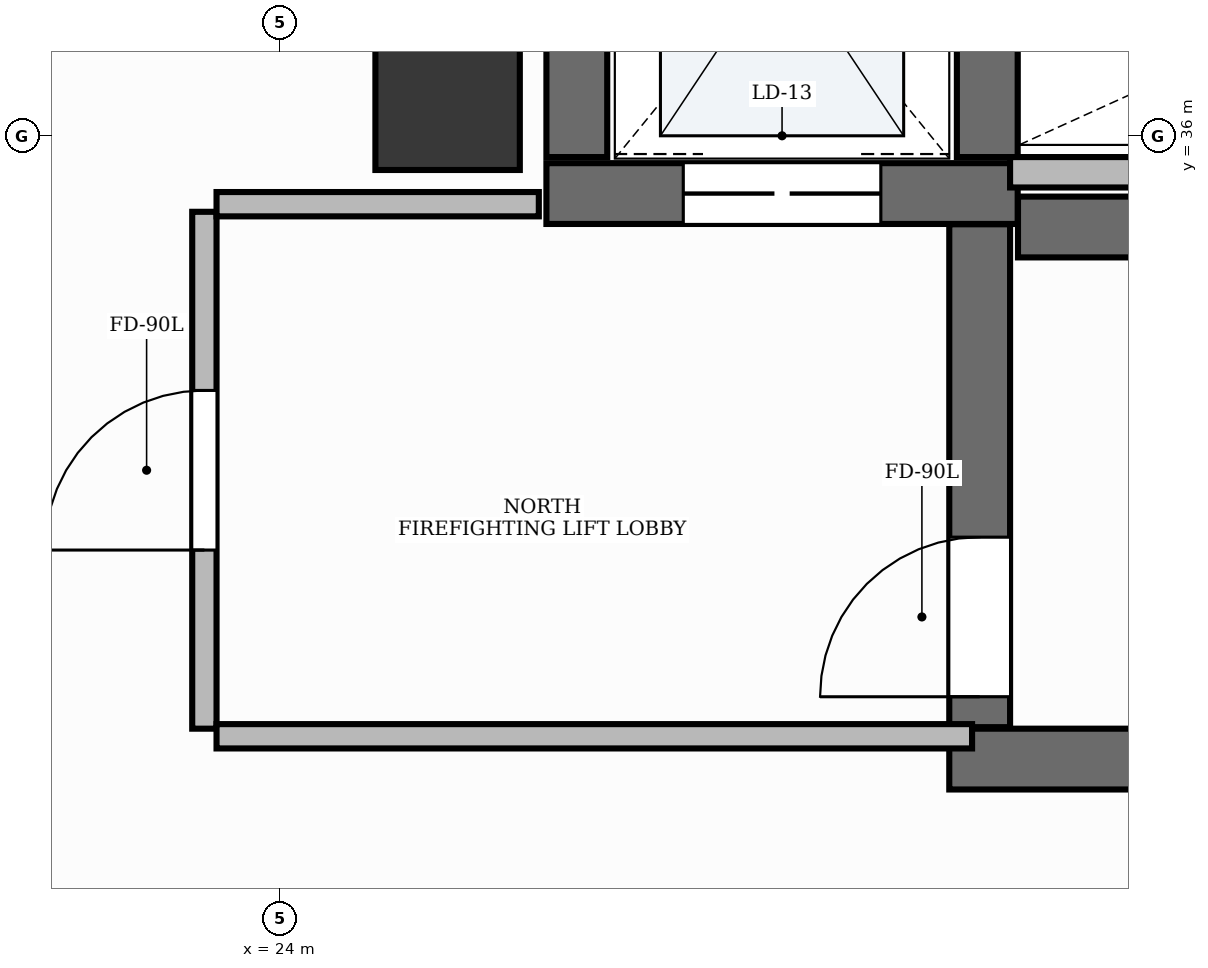
"""IFC4 building model, lengths in metres.
Left out: names, types, materials, properties, quantities, classifications, styles, units other than length and angle.
Written with IfcOpenShell. Run it as: python <this file> out.ifc"""

import sys

from ifc_helpers import new_model, si_unit, direction, frame, frame_2d, origin, origin_2d, place, context, subcontext, project, spatial, rectangle, extrude, element, fill, save


model = new_model("IFC4")
c1 = context("Model", 3, precision=1e-05, world=origin(), true_north=direction((0.0, 1.0)))
c2 = subcontext(c1, "Body", "Model", "MODEL_VIEW")
j1 = project(units=[si_unit("LENGTHUNIT", "METRE"), si_unit("PLANEANGLEUNIT", "RADIAN")], contexts=[c1])
p1 = place(None, origin())
s1 = spatial("IfcSite", under=j1, at=p1, CompositionType="ELEMENT")
p2 = place(p1, origin())
s2 = spatial("IfcBuilding", under=s1, at=p2, CompositionType="ELEMENT")
p3 = place(p2, frame((0.0, 0.0, 218.4)))
s3 = spatial("IfcBuildingStorey", under=s2, at=p3, CompositionType="ELEMENT", Elevation=218.4)
p4 = place(p3, frame((28.852, 35.4, 0.0), z_axis=(0.0, 0.0, 1.0), x_axis=(1.0, 0.0, 0.0)))
e1 = element("IfcWall", 1, at=p4, inside=s3, PredefinedType="SHEAR", context=c2, shape_type="SweptSolid", body=[
    extrude(rectangle(XDim=8.198, YDim=0.4, at=frame_2d((4.099, 0.0))), origin(), (0.0, 0.0, 1.0), 3.9),
])
p5 = place(p3, frame((28.4, 31.9, 0.0), z_axis=(0.0, 0.0, 1.0), x_axis=(1.0, 0.0, 0.0)))
e2 = element("IfcWall", 2, at=p5, inside=s3, PredefinedType="SHEAR", context=c2, shape_type="SweptSolid", body=[
    extrude(rectangle(XDim=8.65, YDim=0.4, at=frame_2d((4.325, 0.0))), origin(), (0.0, 0.0, 1.0), 3.9),
])
p6 = place(p3, frame((28.6, 32.11, 0.0), z_axis=(0.0, 0.0, 1.0), x_axis=(0.0, 1.0, 0.0)))
e3 = element("IfcWall", 3, at=p6, inside=s3, PredefinedType="SHEAR", context=c2, shape_type="SweptSolid", body=[
    extrude(rectangle(XDim=3.308, YDim=0.4, at=frame_2d((1.654, 0.0))), origin(), (0.0, 0.0, 1.0), 3.9),
])
p7 = place(p6, frame((0.2, 0.0, 0.0)))
e4 = element("IfcOpeningElement", 4, at=p7, cuts=e3, PredefinedType="OPENING", context=c2, shape_type="SweptSolid", body=[
    extrude(rectangle(XDim=1.05, YDim=2.15, at=frame_2d((0.525, 1.075))), frame((0.0, 0.215, 0.0), z_axis=(0.0, -1.0, 0.0), x_axis=(1.0, 0.0, 0.0)), (0.0, 0.0, 1.0), 0.43),
])
p8 = place(p3, frame((25.75, 35.62, 0.0), z_axis=(0.0, 0.0, 1.0), x_axis=(1.0, 0.0, 0.0)))
e5 = element("IfcWall", 5, at=p8, inside=s3, PredefinedType="SHEAR", context=c2, shape_type="SweptSolid", body=[
    extrude(rectangle(XDim=3.1, YDim=0.4, at=frame_2d((1.55, 0.0))), origin(), (0.0, 0.0, 1.0), 3.9),
])
p9 = place(p8, frame((0.9, 0.0, 0.0)))
e6 = element("IfcOpeningElement", 6, at=p9, cuts=e5, PredefinedType="OPENING", context=c2, shape_type="SweptSolid", body=[
    extrude(rectangle(XDim=1.3, YDim=2.2, at=frame_2d((0.65, 1.1))), frame((0.0, 0.215, 0.0), z_axis=(0.0, -1.0, 0.0), x_axis=(1.0, 0.0, 0.0)), (0.0, 0.0, 1.0), 0.43),
])
for number, where, z_axis, x_axis in (
    (7, (25.95, 35.86, 0.0), (0.0, 0.0, 1.0), (0.0, 1.0, 0.0)),
    (8, (28.65, 35.86, 0.0), (0.0, 0.0, 1.0), (0.0, 1.0, 0.0)),
):
    element("IfcWall", number, at=place(p3, frame(where, z_axis=z_axis, x_axis=x_axis)), inside=s3, PredefinedType="SHEAR", context=c2, shape_type="SweptSolid", body=[
        extrude(rectangle(XDim=2.7, YDim=0.4, at=frame_2d((1.35, 0.0))), origin(), (0.0, 0.0, 1.0), 3.9),
    ])
p10 = place(p3, frame((25.1, 36.25, -0.0), z_axis=(0.0, 0.0, 1.0), x_axis=(1.0, 0.0, 0.0)))
e9 = element("IfcColumn", 9, at=p10, inside=s3, PredefinedType="PILASTER", context=c2, shape_type="SweptSolid", body=[
    extrude(rectangle(XDim=0.95, YDim=0.95, at=origin_2d()), origin(), (0.0, 0.0, 1.0), 3.901),
])
p11 = place(p3, frame((28.8, 35.76, 0.0), z_axis=(0.0, 0.0, 1.0), x_axis=(1.0, 0.0, 0.0)))
e10 = element("IfcWall", 10, at=p11, inside=s3, PredefinedType="PARTITIONING", context=c2, shape_type="SweptSolid", body=[
    extrude(rectangle(XDim=4.57, YDim=0.2, at=frame_2d((2.285, 0.0))), origin(), (0.0, 0.0, 1.0), 2.91),
])
p12 = place(p3, frame((23.5, 32.1, 0.0), z_axis=(0.0, 0.0, 1.0), x_axis=(0.0, 1.0, 0.0)))
e11 = element("IfcWall", 11, at=p12, inside=s3, PredefinedType="PARTITIONING", context=c2, shape_type="SweptSolid", body=[
    extrude(rectangle(XDim=3.4, YDim=0.16, at=frame_2d((1.7, 0.0))), origin(), (0.0, 0.0, 1.0), 2.91),
])
p13 = place(p12, frame((1.175, 0.0, 0.0)))
e12 = element("IfcOpeningElement", 12, at=p13, cuts=e11, PredefinedType="OPENING", context=c2, shape_type="SweptSolid", body=[
    extrude(rectangle(XDim=1.05, YDim=2.15, at=frame_2d((0.525, 1.075))), frame((0.0, 0.095, 0.0), z_axis=(0.0, -1.0, 0.0), x_axis=(1.0, 0.0, 0.0)), (0.0, 0.0, 1.0), 0.19),
])
p14 = place(p3, frame((23.58, 32.05, 0.0), z_axis=(0.0, 0.0, 1.0), x_axis=(1.0, 0.0, 0.0)))
e13 = element("IfcWall", 13, at=p14, inside=s3, PredefinedType="PARTITIONING", context=c2, shape_type="SweptSolid", body=[
    extrude(rectangle(XDim=4.97, YDim=0.16, at=frame_2d((2.485, 0.0))), origin(), (0.0, 0.0, 1.0), 2.91),
])
p15 = place(p3, frame((23.58, 35.55, 0.0), z_axis=(0.0, 0.0, 1.0), x_axis=(1.0, 0.0, 0.0)))
e14 = element("IfcWall", 14, at=p15, inside=s3, PredefinedType="PARTITIONING", context=c2, shape_type="SweptSolid", body=[
    extrude(rectangle(XDim=2.12, YDim=0.16, at=frame_2d((1.06, 0.0))), origin(), (0.0, 0.0, 1.0), 2.91),
])
p16 = place(p7, origin())
e15 = element("IfcDoor", 15, at=p16, inside=s3, OperationType="SINGLE_SWING_LEFT", PredefinedType="DOOR", context=c2, shape_type="SweptSolid", body=[
    extrude(rectangle(XDim=1.05, YDim=2.15, at=frame_2d((0.525, 1.075))), frame((0.0, 0.025, 0.0), z_axis=(0.0, -1.0, 0.0), x_axis=(1.0, 0.0, 0.0)), (0.0, 0.0, 1.0), 0.05),
])
fill(e4, e15)
p17 = place(p9, origin())
e16 = element("IfcDoor", 16, at=p17, inside=s3, OperationType="DOUBLE_DOOR_SLIDING", PredefinedType="DOOR", context=c2, shape_type="SweptSolid", body=[
    extrude(rectangle(XDim=1.3, YDim=2.2, at=frame_2d((0.65, 1.1))), frame((0.0, 0.025, 0.0), z_axis=(0.0, -1.0, 0.0), x_axis=(1.0, 0.0, 0.0)), (0.0, 0.0, 1.0), 0.05),
])
fill(e6, e16)
p18 = place(p13, origin())
e17 = element("IfcDoor", 17, at=p18, inside=s3, OperationType="SINGLE_SWING_LEFT", PredefinedType="DOOR", context=c2, shape_type="SweptSolid", body=[
    extrude(rectangle(XDim=1.05, YDim=2.15, at=frame_2d((0.525, 1.075))), frame((0.0, 0.025, 0.0), z_axis=(0.0, -1.0, 0.0), x_axis=(1.0, 0.0, 0.0)), (0.0, 0.0, 1.0), 0.05),
])
fill(e12, e17)
save(model, sys.argv[1])
